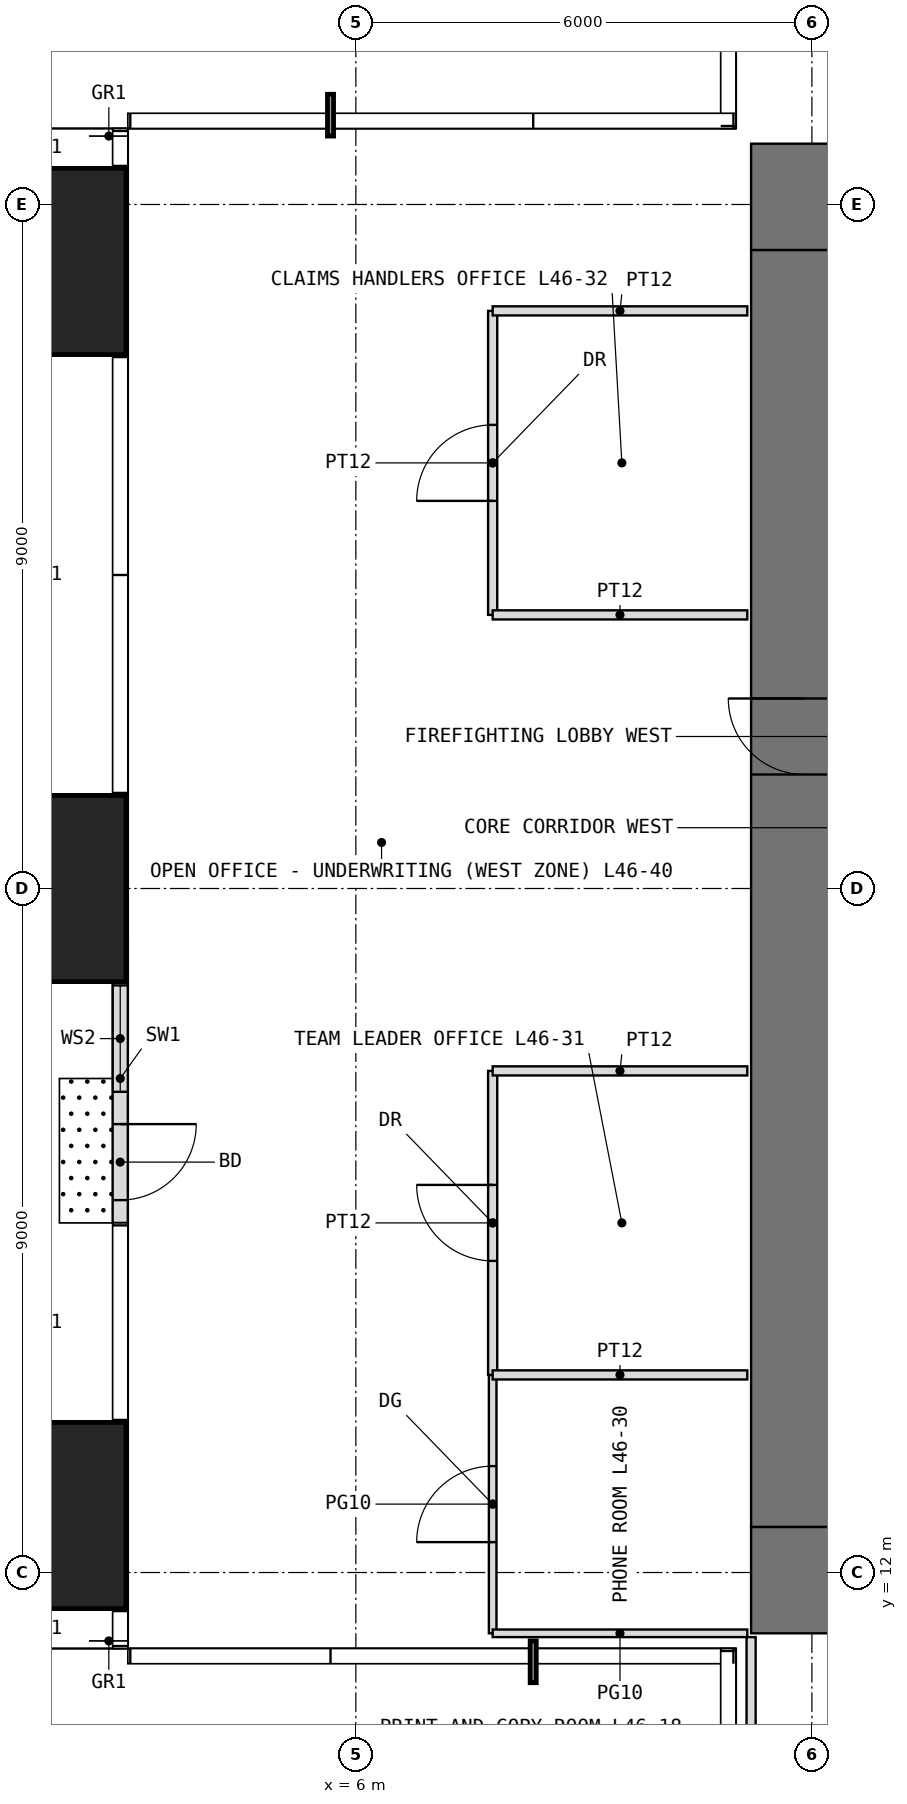
"""IFC4 building model, lengths in metres.
Left out: names, types, materials, properties, quantities, classifications, styles, units other than length and angle.
Written with IfcOpenShell. Run it as: python <this file> out.ifc"""

import sys

from ifc_helpers import new_model, si_unit, direction, frame, frame_2d, origin, origin_2d, place, context, subcontext, project, spatial, rectangle, extrude, element, fill, save


model = new_model("IFC4")
c1 = context("Model", 3, precision=1e-05, world=origin(), true_north=direction((0.0, 1.0)))
c2 = subcontext(c1, "Body", "Model", "MODEL_VIEW")
j1 = project(units=[si_unit("LENGTHUNIT", "METRE"), si_unit("PLANEANGLEUNIT", "RADIAN")], contexts=[c1])
p1 = place(None, origin())
s1 = spatial("IfcSite", under=j1, at=p1, CompositionType="ELEMENT")
p2 = place(p1, origin())
s2 = spatial("IfcBuilding", under=s1, at=p2, CompositionType="ELEMENT")
p3 = place(p2, frame((0.0, 0.0, 194.5)))
s3 = spatial("IfcBuildingStorey", under=s2, at=p3, CompositionType="ELEMENT", Elevation=194.5)
for number, where, z_axis, x_axis in (
    (1, (1.75, 12.75, 0.0), (0.0, 0.0, 1.0), (1.0, 0.0, 0.0)),
    (2, (1.75, 21.0, 0.0), (0.0, 0.0, 1.0), (1.0, 0.0, 0.0)),
    (3, (1.75, 29.25, 0.0), (0.0, 0.0, 1.0), (1.0, 0.0, 0.0)),
):
    element("IfcColumn", number, at=place(p3, frame(where, z_axis=z_axis, x_axis=x_axis)), inside=s3, PredefinedType="COLUMN", context=c2, shape_type="SweptSolid", body=[
        extrude(rectangle(XDim=2.45, YDim=2.45, at=origin_2d()), origin(), (0.0, 0.0, 1.0), 4.0),
    ])
p4 = place(p3, frame((2.9, 20.4, 0.0), z_axis=(0.0, 0.0, 1.0), x_axis=(0.0, -1.0, 0.0)))
e4 = element("IfcWall", 4, at=p4, inside=s3, PredefinedType="USERDEFINED", context=c2, shape_type="SweptSolid", body=[
    extrude(rectangle(XDim=3.8, YDim=0.2, at=frame_2d((1.9, 0.0))), origin(), (0.0, 0.0, 1.0), 3.75),
])
p5 = place(p4, frame((2.5, 0.0, 0.0)))
e5 = element("IfcOpeningElement", 5, at=p5, cuts=e4, PredefinedType="OPENING", context=c2, shape_type="SweptSolid", body=[
    extrude(rectangle(XDim=1.0, YDim=2.4, at=frame_2d((0.5, 1.2))), frame((0.0, 0.11, 0.0), z_axis=(0.0, -1.0, 0.0), x_axis=(1.0, 0.0, 0.0)), (0.0, 0.0, 1.0), 0.22),
])
p6 = place(p4, frame((0.675, 0.0, 0.3)))
e6 = element("IfcOpeningElement", 6, at=p6, cuts=e4, PredefinedType="OPENING", context=c2, shape_type="SweptSolid", body=[
    extrude(rectangle(XDim=1.4, YDim=2.7, at=frame_2d((0.7, 1.35))), frame((0.0, 0.11, 0.0), z_axis=(0.0, -1.0, 0.0), x_axis=(1.0, 0.0, 0.0)), (0.0, 0.0, 1.0), 0.22),
])
p7 = place(p3, frame((11.2, 11.9, -0.05), z_axis=(0.0, 0.0, 1.0), x_axis=(1.0, 0.0, 0.0)))
e7 = element("IfcWall", 7, at=p7, inside=s3, PredefinedType="SHEAR", context=c2, shape_type="SweptSolid", body=[
    extrude(rectangle(XDim=19.6, YDim=1.4, at=frame_2d((9.8, 0.0))), origin(), (0.0, 0.0, 1.0), 4.0),
])
p8 = place(p7, frame((8.8, 0.0, 0.05)))
e8 = element("IfcOpeningElement", 8, at=p8, cuts=e7, PredefinedType="OPENING", context=c2, shape_type="SweptSolid", body=[
    extrude(rectangle(XDim=2.0, YDim=2.2, at=frame_2d((1.0, 1.1))), frame((0.0, 0.71, 0.0), z_axis=(0.0, -1.0, 0.0), x_axis=(1.0, 0.0, 0.0)), (0.0, 0.0, 1.0), 1.42),
])
p9 = place(p3, frame((11.2, 30.1, -0.05), z_axis=(0.0, 0.0, 1.0), x_axis=(1.0, 0.0, 0.0)))
e9 = element("IfcWall", 9, at=p9, inside=s3, PredefinedType="SHEAR", context=c2, shape_type="SweptSolid", body=[
    extrude(rectangle(XDim=19.6, YDim=1.4, at=frame_2d((9.8, 0.0))), origin(), (0.0, 0.0, 1.0), 4.0),
])
p10 = place(p9, frame((8.8, 0.0, 0.05)))
e10 = element("IfcOpeningElement", 10, at=p10, cuts=e9, PredefinedType="OPENING", context=c2, shape_type="SweptSolid", body=[
    extrude(rectangle(XDim=2.0, YDim=2.2, at=frame_2d((1.0, 1.1))), frame((0.0, 0.71, 0.0), z_axis=(0.0, -1.0, 0.0), x_axis=(1.0, 0.0, 0.0)), (0.0, 0.0, 1.0), 1.42),
])
p11 = place(p3, frame((11.9, 12.6, -0.05), z_axis=(0.0, 0.0, 1.0), x_axis=(0.0, 1.0, 0.0)))
e11 = element("IfcWall", 11, at=p11, inside=s3, PredefinedType="SHEAR", context=c2, shape_type="SweptSolid", body=[
    extrude(rectangle(XDim=16.8, YDim=1.4, at=frame_2d((8.4, 0.0))), origin(), (0.0, 0.0, 1.0), 4.0),
])
p12 = place(p11, frame((9.9, 0.0, 0.05)))
e12 = element("IfcOpeningElement", 12, at=p12, cuts=e11, PredefinedType="OPENING", context=c2, shape_type="SweptSolid", body=[
    extrude(rectangle(XDim=1.0, YDim=2.2, at=frame_2d((0.5, 1.1))), frame((0.0, 0.71, 0.0), z_axis=(0.0, -1.0, 0.0), x_axis=(1.0, 0.0, 0.0)), (0.0, 0.0, 1.0), 1.42),
])
p13 = place(p3, frame((7.8, 11.2, 0.0), z_axis=(0.0, 0.0, 1.0), x_axis=(0.0, 1.0, 0.0)))
e13 = element("IfcWall", 13, at=p13, inside=s3, PredefinedType="PARTITIONING", context=c2, shape_type="SweptSolid", body=[
    extrude(rectangle(XDim=3.4, YDim=0.1, at=frame_2d((1.7, 0.0))), origin(), (0.0, 0.0, 1.0), 3.75),
])
p14 = place(p13, frame((1.2, 0.0, 0.0)))
e14 = element("IfcOpeningElement", 14, at=p14, cuts=e13, PredefinedType="OPENING", context=c2, shape_type="SweptSolid", body=[
    extrude(rectangle(XDim=1.0, YDim=2.4, at=frame_2d((0.5, 1.2))), frame((0.0, 0.06, 0.0), z_axis=(0.0, -1.0, 0.0), x_axis=(1.0, 0.0, 0.0)), (0.0, 0.0, 1.0), 0.12),
])
p15 = place(p3, frame((7.8, 11.2, 0.0), z_axis=(0.0, 0.0, 1.0), x_axis=(1.0, 0.0, 0.0)))
e15 = element("IfcWall", 15, at=p15, inside=s3, PredefinedType="PARTITIONING", context=c2, shape_type="SweptSolid", body=[
    extrude(rectangle(XDim=3.35, YDim=0.1, at=frame_2d((1.675, 0.0))), origin(), (0.0, 0.0, 1.0), 3.75),
])
p16 = place(p3, frame((7.8, 14.6, 0.0), z_axis=(0.0, 0.0, 1.0), x_axis=(0.0, 1.0, 0.0)))
e16 = element("IfcWall", 16, at=p16, inside=s3, PredefinedType="PARTITIONING", context=c2, shape_type="SweptSolid", body=[
    extrude(rectangle(XDim=4.0, YDim=0.12, at=frame_2d((2.0, 0.0))), origin(), (0.0, 0.0, 1.0), 3.75),
])
p17 = place(p16, frame((1.5, 0.0, 0.0)))
e17 = element("IfcOpeningElement", 17, at=p17, cuts=e16, PredefinedType="OPENING", context=c2, shape_type="SweptSolid", body=[
    extrude(rectangle(XDim=1.0, YDim=2.2, at=frame_2d((0.5, 1.1))), frame((0.0, 0.07, 0.0), z_axis=(0.0, -1.0, 0.0), x_axis=(1.0, 0.0, 0.0)), (0.0, 0.0, 1.0), 0.14),
])
for number, where, z_axis, x_axis in (
    (18, (7.8, 14.6, 0.0), (0.0, 0.0, 1.0), (1.0, 0.0, 0.0)),
    (19, (7.8, 18.6, 0.0), (0.0, 0.0, 1.0), (1.0, 0.0, 0.0)),
):
    element("IfcWall", number, at=place(p3, frame(where, z_axis=z_axis, x_axis=x_axis)), inside=s3, PredefinedType="PARTITIONING", context=c2, shape_type="SweptSolid", body=[
        extrude(rectangle(XDim=3.35, YDim=0.12, at=frame_2d((1.675, 0.0))), origin(), (0.0, 0.0, 1.0), 3.75),
    ])
p18 = place(p3, frame((7.8, 24.6, 0.0), z_axis=(0.0, 0.0, 1.0), x_axis=(0.0, 1.0, 0.0)))
e20 = element("IfcWall", 20, at=p18, inside=s3, PredefinedType="PARTITIONING", context=c2, shape_type="SweptSolid", body=[
    extrude(rectangle(XDim=4.0, YDim=0.12, at=frame_2d((2.0, 0.0))), origin(), (0.0, 0.0, 1.0), 3.75),
])
p19 = place(p18, frame((1.5, 0.0, 0.0)))
e21 = element("IfcOpeningElement", 21, at=p19, cuts=e20, PredefinedType="OPENING", context=c2, shape_type="SweptSolid", body=[
    extrude(rectangle(XDim=1.0, YDim=2.2, at=frame_2d((0.5, 1.1))), frame((0.0, 0.07, 0.0), z_axis=(0.0, -1.0, 0.0), x_axis=(1.0, 0.0, 0.0)), (0.0, 0.0, 1.0), 0.14),
])
for number, where, z_axis, x_axis in (
    (22, (7.8, 24.6, 0.0), (0.0, 0.0, 1.0), (1.0, 0.0, 0.0)),
    (23, (7.8, 28.6, 0.0), (0.0, 0.0, 1.0), (1.0, 0.0, 0.0)),
):
    element("IfcWall", number, at=place(p3, frame(where, z_axis=z_axis, x_axis=x_axis)), inside=s3, PredefinedType="PARTITIONING", context=c2, shape_type="SweptSolid", body=[
        extrude(rectangle(XDim=3.35, YDim=0.12, at=frame_2d((1.675, 0.0))), origin(), (0.0, 0.0, 1.0), 3.75),
    ])
p20 = place(p3, frame((11.2, 8.7, 0.0), z_axis=(0.0, 0.0, 1.0), x_axis=(0.0, 1.0, 0.0)))
e24 = element("IfcWall", 24, at=p20, inside=s3, PredefinedType="PARTITIONING", context=c2, shape_type="SweptSolid", body=[
    extrude(rectangle(XDim=2.45, YDim=0.12, at=frame_2d((1.225, 0.0))), origin(), (0.0, 0.0, 1.0), 3.75),
])
p21 = place(p5, origin())
e25 = element("IfcDoor", 25, at=p21, inside=s3, OperationType="SINGLE_SWING_LEFT", PredefinedType="DOOR", context=c2, shape_type="SweptSolid", body=[
    extrude(rectangle(XDim=1.0, YDim=2.4, at=frame_2d((0.5, 1.2))), frame((0.0, 0.025, 0.0), z_axis=(0.0, -1.0, 0.0), x_axis=(1.0, 0.0, 0.0)), (0.0, 0.0, 1.0), 0.05),
])
fill(e5, e25)
p22 = place(p6, origin())
e26 = element("IfcWindow", 26, at=p22, inside=s3, PartitioningType="SINGLE_PANEL", PredefinedType="WINDOW", context=c2, shape_type="SweptSolid", body=[
    extrude(rectangle(XDim=1.4, YDim=2.7, at=frame_2d((0.7, 1.35))), frame((0.0, 0.03, 0.0), z_axis=(0.0, -1.0, 0.0), x_axis=(1.0, 0.0, 0.0)), (0.0, 0.0, 1.0), 0.06),
])
fill(e6, e26)
p23 = place(p12, origin())
e27 = element("IfcDoor", 27, at=p23, inside=s3, OperationType="SINGLE_SWING_RIGHT", PredefinedType="DOOR", context=c2, shape_type="SweptSolid", body=[
    extrude(rectangle(XDim=1.0, YDim=2.2, at=frame_2d((0.5, 1.1))), frame((0.0, 0.025, 0.0), z_axis=(0.0, -1.0, 0.0), x_axis=(1.0, 0.0, 0.0)), (0.0, 0.0, 1.0), 0.05),
])
fill(e12, e27)
p24 = place(p14, origin())
e28 = element("IfcDoor", 28, at=p24, inside=s3, OperationType="SINGLE_SWING_LEFT", PredefinedType="DOOR", context=c2, shape_type="SweptSolid", body=[
    extrude(rectangle(XDim=1.0, YDim=2.4, at=frame_2d((0.5, 1.2))), frame((0.0, 0.025, 0.0), z_axis=(0.0, -1.0, 0.0), x_axis=(1.0, 0.0, 0.0)), (0.0, 0.0, 1.0), 0.05),
])
fill(e14, e28)
p25 = place(p17, origin())
e29 = element("IfcDoor", 29, at=p25, inside=s3, OperationType="SINGLE_SWING_RIGHT", PredefinedType="DOOR", context=c2, shape_type="SweptSolid", body=[
    extrude(rectangle(XDim=1.0, YDim=2.2, at=frame_2d((0.5, 1.1))), frame((0.0, 0.025, 0.0), z_axis=(0.0, -1.0, 0.0), x_axis=(1.0, 0.0, 0.0)), (0.0, 0.0, 1.0), 0.05),
])
fill(e17, e29)
p26 = place(p19, origin())
e30 = element("IfcDoor", 30, at=p26, inside=s3, OperationType="SINGLE_SWING_LEFT", PredefinedType="DOOR", context=c2, shape_type="SweptSolid", body=[
    extrude(rectangle(XDim=1.0, YDim=2.2, at=frame_2d((0.5, 1.1))), frame((0.0, 0.025, 0.0), z_axis=(0.0, -1.0, 0.0), x_axis=(1.0, 0.0, 0.0)), (0.0, 0.0, 1.0), 0.05),
])
fill(e21, e30)
save(model, sys.argv[1])
